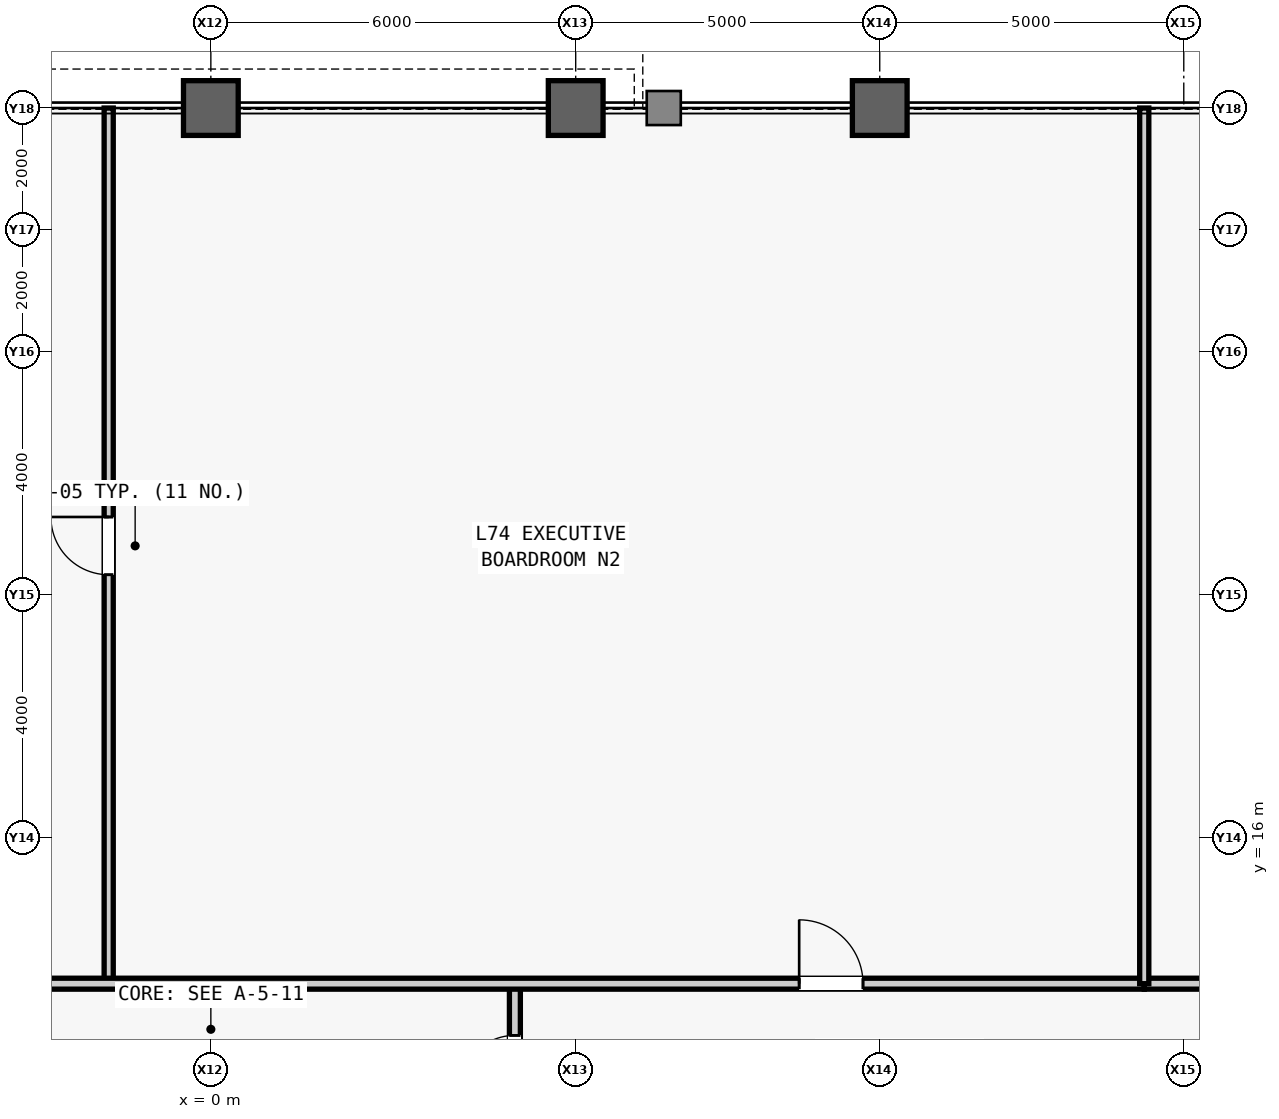
"""IFC4 building model, lengths in metres.
Left out: names, types, materials, properties, quantities, classifications, styles, units other than length and angle.
Written with IfcOpenShell. Run it as: python <this file> out.ifc"""

import sys

from ifc_helpers import new_model, si_unit, direction, frame, frame_2d, origin, origin_2d, place, context, subcontext, project, spatial, rectangle, hollow_rectangle, extrude, source, transform, mapped, element, fill, save


model = new_model("IFC4")
c1 = context("Model", 3, precision=1e-05, world=origin(), true_north=direction((0.0, 1.0)))
c2 = subcontext(c1, "Body", "Model", "MODEL_VIEW")
j1 = project(units=[si_unit("LENGTHUNIT", "METRE"), si_unit("PLANEANGLEUNIT", "RADIAN")], contexts=[c1])
p1 = place(None, origin())
s1 = spatial("IfcSite", under=j1, at=p1, CompositionType="ELEMENT")
p2 = place(p1, origin())
s2 = spatial("IfcBuilding", under=s1, at=p2, CompositionType="ELEMENT")
p3 = place(p2, frame((0.0, 0.0, 313.5)))
s3 = spatial("IfcBuildingStorey", under=s2, at=p3, CompositionType="ELEMENT", Elevation=313.5)
m1 = source(origin(), c2, "Body", "SweptSolid", [
    extrude(hollow_rectangle(XDim=0.9, YDim=0.9, WallThickness=0.05, at=origin_2d()), origin(), (0.0, 0.0, 1.0), 4.0),
])
for number, where, z_axis, x_axis in (
    (1, (0.0, 28.0, 0.0), (0.0, 0.0, 1.0), (1.0, 0.0, 0.0)),
    (2, (6.0, 28.0, 0.0), (0.0, 0.0, 1.0), (1.0, 0.0, 0.0)),
    (3, (11.0, 28.0, 0.0), (0.0, 0.0, 1.0), (1.0, 0.0, 0.0)),
):
    element("IfcColumn", number, at=place(p3, frame(where, z_axis=z_axis, x_axis=x_axis)), inside=s3, PredefinedType="COLUMN", context=c2, shape_type="MappedRepresentation", body=[
        mapped(m1, transform((0.0, 0.0, 0.0), scale=1.0)),
    ])
m2 = source(origin(), c2, "Body", "SweptSolid", [
    extrude(rectangle(XDim=2.6, YDim=0.18, at=frame_2d((1.3, 0.0))), origin(), (0.0, 0.0, 1.0), 3.78),
])
p4 = place(p3, frame((5.0, 11.0, 0.0), z_axis=(0.0, 0.0, 1.0), x_axis=(0.0, 1.0, 0.0)))
e4 = element("IfcWall", 4, at=p4, inside=s3, PredefinedType="PARTITIONING", context=c2, shape_type="MappedRepresentation", body=[
    mapped(m2, transform((0.0, 0.0, 0.0), scale=1.0)),
])
m3 = source(origin(), c2, "Body", "SweptSolid", [
    extrude(rectangle(XDim=0.9, YDim=2.15, at=frame_2d((0.45, 1.075))), frame((0.0, 0.1, 0.0), z_axis=(0.0, -1.0, 0.0), x_axis=(1.0, 0.0, 0.0)), (0.0, 0.0, 1.0), 0.2),
])
p5 = place(p4, frame((0.85, 0.0, 0.0)))
e5 = element("IfcOpeningElement", 5, at=p5, cuts=e4, PredefinedType="OPENING", context=c2, shape_type="MappedRepresentation", body=[
    mapped(m3, transform((0.0, 0.0, 0.0), scale=1.0)),
])
m4 = source(origin(), c2, "Body", "SweptSolid", [
    extrude(rectangle(XDim=2.4, YDim=0.18, at=frame_2d((1.2, 0.0))), origin(), (0.0, 0.0, 1.0), 3.78),
])
p6 = place(p3, frame((15.35, 13.6, 0.0), z_axis=(0.0, 0.0, 1.0), x_axis=(1.0, 0.0, 0.0)))
e6 = element("IfcWall", 6, at=p6, inside=s3, PredefinedType="PARTITIONING", context=c2, shape_type="MappedRepresentation", body=[
    mapped(m4, transform((0.0, 0.0, 0.0), scale=1.0)),
])
m5 = source(origin(), c2, "Body", "SweptSolid", [
    extrude(rectangle(XDim=14.4, YDim=0.15, at=frame_2d((7.2, 0.0))), origin(), (0.0, 0.0, 1.0), 3.78),
])
p7 = place(p3, frame((-1.68, 13.6, 0.0), z_axis=(0.0, 0.0, 1.0), x_axis=(0.0, 1.0, 0.0)))
e7 = element("IfcWall", 7, at=p7, inside=s3, PredefinedType="PARTITIONING", context=c2, shape_type="MappedRepresentation", body=[
    mapped(m5, transform((0.0, 0.0, 0.0), scale=1.0)),
])
m6 = source(origin(), c2, "Body", "SweptSolid", [
    extrude(rectangle(XDim=0.95, YDim=2.15, at=frame_2d((0.475, 1.075))), frame((0.0, 0.085, 0.0), z_axis=(0.0, -1.0, 0.0), x_axis=(1.0, 0.0, 0.0)), (0.0, 0.0, 1.0), 0.17),
])
p8 = place(p7, frame((6.725, 0.0, 0.0)))
e8 = element("IfcOpeningElement", 8, at=p8, cuts=e7, PredefinedType="OPENING", context=c2, shape_type="MappedRepresentation", body=[
    mapped(m6, transform((0.0, 0.0, 0.0), scale=1.0)),
])
m7 = source(origin(), c2, "Body", "SweptSolid", [
    extrude(rectangle(XDim=32.75, YDim=0.18, at=frame_2d((16.375, 0.0))), origin(), (0.0, 0.0, 1.0), 3.78),
])
p9 = place(p3, frame((-17.4, 13.6, 0.0), z_axis=(0.0, 0.0, 1.0), x_axis=(1.0, 0.0, 0.0)))
e9 = element("IfcWall", 9, at=p9, inside=s3, PredefinedType="PARTITIONING", context=c2, shape_type="MappedRepresentation", body=[
    mapped(m7, transform((0.0, 0.0, 0.0), scale=1.0)),
])
m8 = source(origin(), c2, "Body", "SweptSolid", [
    extrude(rectangle(XDim=1.05, YDim=2.2, at=frame_2d((0.525, 1.1))), frame((0.0, 0.1, 0.0), z_axis=(0.0, -1.0, 0.0), x_axis=(1.0, 0.0, 0.0)), (0.0, 0.0, 1.0), 0.2),
])
p10 = place(p9, frame((27.075, 0.0, 0.0)))
e10 = element("IfcOpeningElement", 10, at=p10, cuts=e9, PredefinedType="OPENING", context=c2, shape_type="MappedRepresentation", body=[
    mapped(m8, transform((0.0, 0.0, 0.0), scale=1.0)),
])
p11 = place(p3, frame((15.35, 13.6, 0.0), z_axis=(0.0, 0.0, 1.0), x_axis=(0.0, 1.0, 0.0)))
e11 = element("IfcWall", 11, at=p11, inside=s3, PredefinedType="PARTITIONING", context=c2, shape_type="MappedRepresentation", body=[
    mapped(m5, transform((0.0, 0.0, 0.0), scale=1.0)),
])
m9 = source(origin(), c2, "Body", "SweptSolid", [
    extrude(rectangle(XDim=0.9, YDim=2.15, at=frame_2d((0.45, 1.075))), frame((0.0, 0.025, 0.0), z_axis=(0.0, -1.0, 0.0), x_axis=(1.0, 0.0, 0.0)), (0.0, 0.0, 1.0), 0.05),
])
p12 = place(p5, origin())
e12 = element("IfcDoor", 12, at=p12, inside=s3, OperationType="SINGLE_SWING_LEFT", PredefinedType="DOOR", context=c2, shape_type="MappedRepresentation", body=[
    mapped(m9, transform((0.0, 0.0, 0.0), scale=1.0)),
])
fill(e5, e12)
m10 = source(origin(), c2, "Body", "SweptSolid", [
    extrude(rectangle(XDim=0.95, YDim=2.15, at=frame_2d((0.475, 1.075))), frame((0.0, 0.025, 0.0), z_axis=(0.0, -1.0, 0.0), x_axis=(1.0, 0.0, 0.0)), (0.0, 0.0, 1.0), 0.05),
])
p13 = place(p8, origin())
e13 = element("IfcDoor", 13, at=p13, inside=s3, OperationType="SINGLE_SWING_RIGHT", PredefinedType="DOOR", context=c2, shape_type="MappedRepresentation", body=[
    mapped(m10, transform((0.0, 0.0, 0.0), scale=1.0)),
])
fill(e8, e13)
m11 = source(origin(), c2, "Body", "SweptSolid", [
    extrude(rectangle(XDim=1.05, YDim=2.2, at=frame_2d((0.525, 1.1))), frame((0.0, 0.025, 0.0), z_axis=(0.0, -1.0, 0.0), x_axis=(1.0, 0.0, 0.0)), (0.0, 0.0, 1.0), 0.05),
])
p14 = place(p10, origin())
e14 = element("IfcDoor", 14, at=p14, inside=s3, OperationType="SINGLE_SWING_LEFT", PredefinedType="DOOR", context=c2, shape_type="MappedRepresentation", body=[
    mapped(m11, transform((0.0, 0.0, 0.0), scale=1.0)),
])
fill(e10, e14)
save(model, sys.argv[1])
